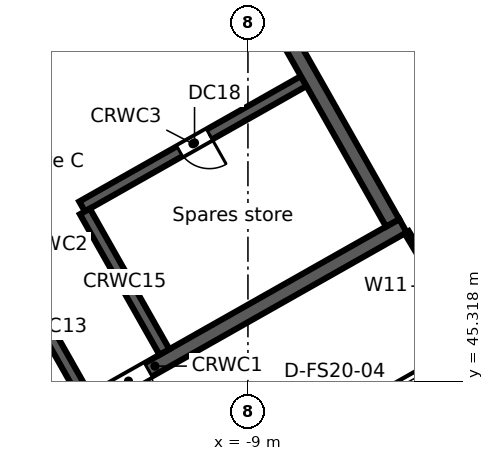
"""IFC4 building model, lengths in metres.
Left out: names, types, materials, properties, quantities, classifications, styles, units other than length and angle.
Written with IfcOpenShell. Run it as: python <this file> out.ifc"""

import sys

from ifc_helpers import new_model, si_unit, direction, frame, frame_2d, origin, place, context, subcontext, project, spatial, rectangle, extrude, element, fill, save


model = new_model("IFC4")
c1 = context("Model", 3, precision=1e-05, world=origin(), true_north=direction((0.0, 1.0)))
c2 = subcontext(c1, "Body", "Model", "MODEL_VIEW")
j1 = project(units=[si_unit("LENGTHUNIT", "METRE"), si_unit("PLANEANGLEUNIT", "RADIAN")], contexts=[c1])
p1 = place(None, origin())
s1 = spatial("IfcSite", under=j1, at=p1, CompositionType="ELEMENT")
p2 = place(p1, origin())
s2 = spatial("IfcBuilding", under=s1, at=p2, CompositionType="ELEMENT")
p3 = place(p2, frame((0.0, 0.0, 308.3)))
s3 = spatial("IfcBuildingStorey", under=s2, at=p3, CompositionType="ELEMENT", Elevation=308.3)
p4 = place(p3, frame((-58.732, 38.771, 0.0), z_axis=(0.0, 0.0, 1.0), x_axis=(0.870355615581, 0.492423702137, 0.0)))
e1 = element("IfcWall", 1, at=p4, inside=s3, PredefinedType="STANDARD", context=c2, shape_type="SweptSolid", body=[
    extrude(rectangle(XDim=64.052, YDim=0.25, at=frame_2d((32.026, 0.0))), origin(), (0.0, 0.0, 1.0), 3.45),
])
p5 = place(p4, frame((61.259, 0.0, 0.8)))
e2 = element("IfcOpeningElement", 2, at=p5, cuts=e1, PredefinedType="OPENING", context=c2, shape_type="SweptSolid", body=[
    extrude(rectangle(XDim=2.4, YDim=2.2, at=frame_2d((1.2, 1.1))), frame((0.0, 0.135, 0.0), z_axis=(0.0, -1.0, 0.0), x_axis=(1.0, 0.0, 0.0)), (0.0, 0.0, 1.0), 0.27),
])
p6 = place(p4, frame((58.216, 0.0, 0.8)))
e3 = element("IfcOpeningElement", 3, at=p6, cuts=e1, PredefinedType="OPENING", context=c2, shape_type="SweptSolid", body=[
    extrude(rectangle(XDim=2.4, YDim=2.2, at=frame_2d((1.2, 1.1))), frame((0.0, 0.135, 0.0), z_axis=(0.0, -1.0, 0.0), x_axis=(1.0, 0.0, 0.0)), (0.0, 0.0, 1.0), 0.27),
])
p7 = place(p4, frame((55.173, 0.0, 0.8)))
e4 = element("IfcOpeningElement", 4, at=p7, cuts=e1, PredefinedType="OPENING", context=c2, shape_type="SweptSolid", body=[
    extrude(rectangle(XDim=2.4, YDim=2.2, at=frame_2d((1.2, 1.1))), frame((0.0, 0.135, 0.0), z_axis=(0.0, -1.0, 0.0), x_axis=(1.0, 0.0, 0.0)), (0.0, 0.0, 1.0), 0.27),
])
p8 = place(p4, frame((52.129, 0.0, 0.8)))
e5 = element("IfcOpeningElement", 5, at=p8, cuts=e1, PredefinedType="OPENING", context=c2, shape_type="SweptSolid", body=[
    extrude(rectangle(XDim=2.4, YDim=2.2, at=frame_2d((1.2, 1.1))), frame((0.0, 0.135, 0.0), z_axis=(0.0, -1.0, 0.0), x_axis=(1.0, 0.0, 0.0)), (0.0, 0.0, 1.0), 0.27),
])
p9 = place(p4, frame((49.086, 0.0, 0.8)))
e6 = element("IfcOpeningElement", 6, at=p9, cuts=e1, PredefinedType="OPENING", context=c2, shape_type="SweptSolid", body=[
    extrude(rectangle(XDim=2.4, YDim=2.2, at=frame_2d((1.2, 1.1))), frame((0.0, 0.135, 0.0), z_axis=(0.0, -1.0, 0.0), x_axis=(1.0, 0.0, 0.0)), (0.0, 0.0, 1.0), 0.27),
])
p10 = place(p4, frame((46.043, 0.0, 0.8)))
e7 = element("IfcOpeningElement", 7, at=p10, cuts=e1, PredefinedType="OPENING", context=c2, shape_type="SweptSolid", body=[
    extrude(rectangle(XDim=2.4, YDim=2.2, at=frame_2d((1.2, 1.1))), frame((0.0, 0.135, 0.0), z_axis=(0.0, -1.0, 0.0), x_axis=(1.0, 0.0, 0.0)), (0.0, 0.0, 1.0), 0.27),
])
p11 = place(p4, frame((43.0, 0.0, 0.8)))
e8 = element("IfcOpeningElement", 8, at=p11, cuts=e1, PredefinedType="OPENING", context=c2, shape_type="SweptSolid", body=[
    extrude(rectangle(XDim=2.4, YDim=2.2, at=frame_2d((1.2, 1.1))), frame((0.0, 0.135, 0.0), z_axis=(0.0, -1.0, 0.0), x_axis=(1.0, 0.0, 0.0)), (0.0, 0.0, 1.0), 0.27),
])
p12 = place(p4, frame((39.956, 0.0, 0.8)))
e9 = element("IfcOpeningElement", 9, at=p12, cuts=e1, PredefinedType="OPENING", context=c2, shape_type="SweptSolid", body=[
    extrude(rectangle(XDim=2.4, YDim=2.2, at=frame_2d((1.2, 1.1))), frame((0.0, 0.135, 0.0), z_axis=(0.0, -1.0, 0.0), x_axis=(1.0, 0.0, 0.0)), (0.0, 0.0, 1.0), 0.27),
])
p13 = place(p4, frame((36.913, 0.0, 0.8)))
e10 = element("IfcOpeningElement", 10, at=p13, cuts=e1, PredefinedType="OPENING", context=c2, shape_type="SweptSolid", body=[
    extrude(rectangle(XDim=2.4, YDim=2.2, at=frame_2d((1.2, 1.1))), frame((0.0, 0.135, 0.0), z_axis=(0.0, -1.0, 0.0), x_axis=(1.0, 0.0, 0.0)), (0.0, 0.0, 1.0), 0.27),
])
p14 = place(p4, frame((33.87, 0.0, 0.8)))
e11 = element("IfcOpeningElement", 11, at=p14, cuts=e1, PredefinedType="OPENING", context=c2, shape_type="SweptSolid", body=[
    extrude(rectangle(XDim=2.4, YDim=2.2, at=frame_2d((1.2, 1.1))), frame((0.0, 0.135, 0.0), z_axis=(0.0, -1.0, 0.0), x_axis=(1.0, 0.0, 0.0)), (0.0, 0.0, 1.0), 0.27),
])
p15 = place(p4, frame((30.826, 0.0, 0.8)))
e12 = element("IfcOpeningElement", 12, at=p15, cuts=e1, PredefinedType="OPENING", context=c2, shape_type="SweptSolid", body=[
    extrude(rectangle(XDim=2.4, YDim=2.2, at=frame_2d((1.2, 1.1))), frame((0.0, 0.135, 0.0), z_axis=(0.0, -1.0, 0.0), x_axis=(1.0, 0.0, 0.0)), (0.0, 0.0, 1.0), 0.27),
])
p16 = place(p4, frame((27.783, 0.0, 0.8)))
e13 = element("IfcOpeningElement", 13, at=p16, cuts=e1, PredefinedType="OPENING", context=c2, shape_type="SweptSolid", body=[
    extrude(rectangle(XDim=2.4, YDim=2.2, at=frame_2d((1.2, 1.1))), frame((0.0, 0.135, 0.0), z_axis=(0.0, -1.0, 0.0), x_axis=(1.0, 0.0, 0.0)), (0.0, 0.0, 1.0), 0.27),
])
p17 = place(p4, frame((24.74, 0.0, 0.8)))
e14 = element("IfcOpeningElement", 14, at=p17, cuts=e1, PredefinedType="OPENING", context=c2, shape_type="SweptSolid", body=[
    extrude(rectangle(XDim=2.4, YDim=2.2, at=frame_2d((1.2, 1.1))), frame((0.0, 0.135, 0.0), z_axis=(0.0, -1.0, 0.0), x_axis=(1.0, 0.0, 0.0)), (0.0, 0.0, 1.0), 0.27),
])
p18 = place(p4, frame((21.696, 0.0, 0.8)))
e15 = element("IfcOpeningElement", 15, at=p18, cuts=e1, PredefinedType="OPENING", context=c2, shape_type="SweptSolid", body=[
    extrude(rectangle(XDim=2.4, YDim=2.2, at=frame_2d((1.2, 1.1))), frame((0.0, 0.135, 0.0), z_axis=(0.0, -1.0, 0.0), x_axis=(1.0, 0.0, 0.0)), (0.0, 0.0, 1.0), 0.27),
])
p19 = place(p4, frame((18.653, 0.0, 0.8)))
e16 = element("IfcOpeningElement", 16, at=p19, cuts=e1, PredefinedType="OPENING", context=c2, shape_type="SweptSolid", body=[
    extrude(rectangle(XDim=2.4, YDim=2.2, at=frame_2d((1.2, 1.1))), frame((0.0, 0.135, 0.0), z_axis=(0.0, -1.0, 0.0), x_axis=(1.0, 0.0, 0.0)), (0.0, 0.0, 1.0), 0.27),
])
p20 = place(p4, frame((15.61, 0.0, 0.8)))
e17 = element("IfcOpeningElement", 17, at=p20, cuts=e1, PredefinedType="OPENING", context=c2, shape_type="SweptSolid", body=[
    extrude(rectangle(XDim=2.4, YDim=2.2, at=frame_2d((1.2, 1.1))), frame((0.0, 0.135, 0.0), z_axis=(0.0, -1.0, 0.0), x_axis=(1.0, 0.0, 0.0)), (0.0, 0.0, 1.0), 0.27),
])
p21 = place(p4, frame((12.567, 0.0, 0.8)))
e18 = element("IfcOpeningElement", 18, at=p21, cuts=e1, PredefinedType="OPENING", context=c2, shape_type="SweptSolid", body=[
    extrude(rectangle(XDim=2.4, YDim=2.2, at=frame_2d((1.2, 1.1))), frame((0.0, 0.135, 0.0), z_axis=(0.0, -1.0, 0.0), x_axis=(1.0, 0.0, 0.0)), (0.0, 0.0, 1.0), 0.27),
])
p22 = place(p4, frame((9.523, 0.0, 0.8)))
e19 = element("IfcOpeningElement", 19, at=p22, cuts=e1, PredefinedType="OPENING", context=c2, shape_type="SweptSolid", body=[
    extrude(rectangle(XDim=2.4, YDim=2.2, at=frame_2d((1.2, 1.1))), frame((0.0, 0.135, 0.0), z_axis=(0.0, -1.0, 0.0), x_axis=(1.0, 0.0, 0.0)), (0.0, 0.0, 1.0), 0.27),
])
p23 = place(p4, frame((6.48, 0.0, 0.8)))
e20 = element("IfcOpeningElement", 20, at=p23, cuts=e1, PredefinedType="OPENING", context=c2, shape_type="SweptSolid", body=[
    extrude(rectangle(XDim=2.4, YDim=2.2, at=frame_2d((1.2, 1.1))), frame((0.0, 0.135, 0.0), z_axis=(0.0, -1.0, 0.0), x_axis=(1.0, 0.0, 0.0)), (0.0, 0.0, 1.0), 0.27),
])
p24 = place(p4, frame((3.437, 0.0, 0.8)))
e21 = element("IfcOpeningElement", 21, at=p24, cuts=e1, PredefinedType="OPENING", context=c2, shape_type="SweptSolid", body=[
    extrude(rectangle(XDim=2.4, YDim=2.2, at=frame_2d((1.2, 1.1))), frame((0.0, 0.135, 0.0), z_axis=(0.0, -1.0, 0.0), x_axis=(1.0, 0.0, 0.0)), (0.0, 0.0, 1.0), 0.27),
])
p25 = place(p4, frame((0.393, 0.0, 0.8)))
e22 = element("IfcOpeningElement", 22, at=p25, cuts=e1, PredefinedType="OPENING", context=c2, shape_type="SweptSolid", body=[
    extrude(rectangle(XDim=2.4, YDim=2.2, at=frame_2d((1.2, 1.1))), frame((0.0, 0.135, 0.0), z_axis=(0.0, -1.0, 0.0), x_axis=(1.0, 0.0, 0.0)), (0.0, 0.0, 1.0), 0.27),
])
p26 = place(p3, frame((-3.017, 46.293, 0.0), z_axis=(0.0, 0.0, 1.0), x_axis=(-0.870355474887, -0.492423950812, 0.0)))
e23 = element("IfcWall", 23, at=p26, inside=s3, PredefinedType="STANDARD", context=c2, shape_type="SweptSolid", body=[
    extrude(rectangle(XDim=40.34, YDim=0.25, at=frame_2d((20.17, 0.0))), origin(), (0.0, 0.0, 1.0), 3.45),
])
p27 = place(p26, frame((37.428, 0.0, 0.8)))
e24 = element("IfcOpeningElement", 24, at=p27, cuts=e23, PredefinedType="OPENING", context=c2, shape_type="SweptSolid", body=[
    extrude(rectangle(XDim=2.4, YDim=2.2, at=frame_2d((1.2, 1.1))), frame((0.0, 0.135, 0.0), z_axis=(0.0, -1.0, 0.0), x_axis=(1.0, 0.0, 0.0)), (0.0, 0.0, 1.0), 0.27),
])
p28 = place(p26, frame((34.372, 0.0, 0.0)))
e25 = element("IfcOpeningElement", 25, at=p28, cuts=e23, PredefinedType="OPENING", context=c2, shape_type="SweptSolid", body=[
    extrude(rectangle(XDim=1.8, YDim=2.4, at=frame_2d((0.9, 1.2))), frame((0.0, 0.135, 0.0), z_axis=(0.0, -1.0, 0.0), x_axis=(1.0, 0.0, 0.0)), (0.0, 0.0, 1.0), 0.27),
])
p29 = place(p26, frame((30.716, 0.0, 0.8)))
e26 = element("IfcOpeningElement", 26, at=p29, cuts=e23, PredefinedType="OPENING", context=c2, shape_type="SweptSolid", body=[
    extrude(rectangle(XDim=2.4, YDim=2.2, at=frame_2d((1.2, 1.1))), frame((0.0, 0.135, 0.0), z_axis=(0.0, -1.0, 0.0), x_axis=(1.0, 0.0, 0.0)), (0.0, 0.0, 1.0), 0.27),
])
p30 = place(p26, frame((27.36, 0.0, 0.8)))
e27 = element("IfcOpeningElement", 27, at=p30, cuts=e23, PredefinedType="OPENING", context=c2, shape_type="SweptSolid", body=[
    extrude(rectangle(XDim=2.4, YDim=2.2, at=frame_2d((1.2, 1.1))), frame((0.0, 0.135, 0.0), z_axis=(0.0, -1.0, 0.0), x_axis=(1.0, 0.0, 0.0)), (0.0, 0.0, 1.0), 0.27),
])
p31 = place(p26, frame((24.304, 0.0, 0.0)))
e28 = element("IfcOpeningElement", 28, at=p31, cuts=e23, PredefinedType="OPENING", context=c2, shape_type="SweptSolid", body=[
    extrude(rectangle(XDim=1.8, YDim=2.4, at=frame_2d((0.9, 1.2))), frame((0.0, 0.135, 0.0), z_axis=(0.0, -1.0, 0.0), x_axis=(1.0, 0.0, 0.0)), (0.0, 0.0, 1.0), 0.27),
])
p32 = place(p26, frame((20.648, 0.0, 0.8)))
e29 = element("IfcOpeningElement", 29, at=p32, cuts=e23, PredefinedType="OPENING", context=c2, shape_type="SweptSolid", body=[
    extrude(rectangle(XDim=2.4, YDim=2.2, at=frame_2d((1.2, 1.1))), frame((0.0, 0.135, 0.0), z_axis=(0.0, -1.0, 0.0), x_axis=(1.0, 0.0, 0.0)), (0.0, 0.0, 1.0), 0.27),
])
p33 = place(p26, frame((17.292, 0.0, 0.8)))
e30 = element("IfcOpeningElement", 30, at=p33, cuts=e23, PredefinedType="OPENING", context=c2, shape_type="SweptSolid", body=[
    extrude(rectangle(XDim=2.4, YDim=2.2, at=frame_2d((1.2, 1.1))), frame((0.0, 0.135, 0.0), z_axis=(0.0, -1.0, 0.0), x_axis=(1.0, 0.0, 0.0)), (0.0, 0.0, 1.0), 0.27),
])
p34 = place(p26, frame((14.236, 0.0, 0.0)))
e31 = element("IfcOpeningElement", 31, at=p34, cuts=e23, PredefinedType="OPENING", context=c2, shape_type="SweptSolid", body=[
    extrude(rectangle(XDim=1.8, YDim=2.4, at=frame_2d((0.9, 1.2))), frame((0.0, 0.135, 0.0), z_axis=(0.0, -1.0, 0.0), x_axis=(1.0, 0.0, 0.0)), (0.0, 0.0, 1.0), 0.27),
])
p35 = place(p26, frame((10.58, 0.0, 0.8)))
e32 = element("IfcOpeningElement", 32, at=p35, cuts=e23, PredefinedType="OPENING", context=c2, shape_type="SweptSolid", body=[
    extrude(rectangle(XDim=2.4, YDim=2.2, at=frame_2d((1.2, 1.1))), frame((0.0, 0.135, 0.0), z_axis=(0.0, -1.0, 0.0), x_axis=(1.0, 0.0, 0.0)), (0.0, 0.0, 1.0), 0.27),
])
p36 = place(p26, frame((7.224, 0.0, 0.8)))
e33 = element("IfcOpeningElement", 33, at=p36, cuts=e23, PredefinedType="OPENING", context=c2, shape_type="SweptSolid", body=[
    extrude(rectangle(XDim=2.4, YDim=2.2, at=frame_2d((1.2, 1.1))), frame((0.0, 0.135, 0.0), z_axis=(0.0, -1.0, 0.0), x_axis=(1.0, 0.0, 0.0)), (0.0, 0.0, 1.0), 0.27),
])
p37 = place(p26, frame((4.168, 0.0, 0.0)))
e34 = element("IfcOpeningElement", 34, at=p37, cuts=e23, PredefinedType="OPENING", context=c2, shape_type="SweptSolid", body=[
    extrude(rectangle(XDim=1.8, YDim=2.4, at=frame_2d((0.9, 1.2))), frame((0.0, 0.135, 0.0), z_axis=(0.0, -1.0, 0.0), x_axis=(1.0, 0.0, 0.0)), (0.0, 0.0, 1.0), 0.27),
])
p38 = place(p26, frame((0.512, 0.0, 0.8)))
e35 = element("IfcOpeningElement", 35, at=p38, cuts=e23, PredefinedType="OPENING", context=c2, shape_type="SweptSolid", body=[
    extrude(rectangle(XDim=2.4, YDim=2.2, at=frame_2d((1.2, 1.1))), frame((0.0, 0.135, 0.0), z_axis=(0.0, -1.0, 0.0), x_axis=(1.0, 0.0, 0.0)), (0.0, 0.0, 1.0), 0.27),
])
p39 = place(p3, frame((-17.975, 42.017, 0.0), z_axis=(0.0, 0.0, 1.0), x_axis=(0.87034965173, 0.492434243055, 0.0)))
e36 = element("IfcWall", 36, at=p39, inside=s3, PredefinedType="SOLIDWALL", context=c2, shape_type="SweptSolid", body=[
    extrude(rectangle(XDim=15.0, YDim=0.4, at=frame_2d((7.5, 0.0))), origin(), (0.0, 0.0, 1.0), 3.45),
])
p40 = place(p39, frame((6.1, 0.0, 0.0)))
e37 = element("IfcOpeningElement", 37, at=p40, cuts=e36, PredefinedType="OPENING", context=c2, shape_type="SweptSolid", body=[
    extrude(rectangle(XDim=1.2, YDim=2.1, at=frame_2d((0.6, 1.05))), frame((0.0, 0.21, 0.0), z_axis=(0.0, -1.0, 0.0), x_axis=(1.0, 0.0, 0.0)), (0.0, 0.0, 1.0), 0.42),
])
p41 = place(p3, frame((-13.365, 49.911, 0.0), z_axis=(0.0, 0.0, 1.0), x_axis=(0.870347618718, 0.492437836272, 0.0)))
e38 = element("IfcWall", 38, at=p41, inside=s3, PredefinedType="SOLIDWALL", context=c2, shape_type="SweptSolid", body=[
    extrude(rectangle(XDim=6.7, YDim=0.3, at=frame_2d((3.35, 0.0))), origin(), (0.0, 0.0, 1.0), 3.45),
])
p42 = place(p41, frame((2.95, 0.0, 0.0)))
e39 = element("IfcOpeningElement", 39, at=p42, cuts=e38, PredefinedType="OPENING", context=c2, shape_type="SweptSolid", body=[
    extrude(rectangle(XDim=0.9, YDim=2.1, at=frame_2d((0.45, 1.05))), frame((0.0, 0.16, 0.0), z_axis=(0.0, -1.0, 0.0), x_axis=(1.0, 0.0, 0.0)), (0.0, 0.0, 1.0), 0.32),
])
p43 = place(p3, frame((-15.618, 53.691, 0.0), z_axis=(0.0, 0.0, 1.0), x_axis=(0.870362830851, 0.492410948978, 0.0)))
e40 = element("IfcWall", 40, at=p43, inside=s3, PredefinedType="SOLIDWALL", context=c2, shape_type="SweptSolid", body=[
    extrude(rectangle(XDim=6.8, YDim=0.3, at=frame_2d((3.4, 0.0))), origin(), (0.0, 0.0, 1.0), 3.45),
])
p44 = place(p43, frame((3.4, 0.0, 0.0)))
e41 = element("IfcOpeningElement", 41, at=p44, cuts=e40, PredefinedType="OPENING", context=c2, shape_type="SweptSolid", body=[
    extrude(rectangle(XDim=0.9, YDim=2.1, at=frame_2d((0.45, 1.05))), frame((0.0, 0.16, 0.0), z_axis=(0.0, -1.0, 0.0), x_axis=(1.0, 0.0, 0.0)), (0.0, 0.0, 1.0), 0.32),
])
p45 = place(p3, frame((-24.672, 53.854, 0.0), z_axis=(0.0, 0.0, 1.0), x_axis=(0.870353598469, 0.492427267353, 0.0)))
e42 = element("IfcWall", 42, at=p45, inside=s3, PredefinedType="SOLIDWALL", context=c2, shape_type="SweptSolid", body=[
    extrude(rectangle(XDim=15.0, YDim=0.4, at=frame_2d((7.5, 0.0))), origin(), (0.0, 0.0, 1.0), 3.45),
])
p46 = place(p3, frame((-15.379, 48.599, 0.0), z_axis=(0.0, 0.0, 1.0), x_axis=(0.492422543467, -0.870356271124, 0.0)))
e43 = element("IfcWall", 43, at=p46, inside=s3, PredefinedType="SOLIDWALL", context=c2, shape_type="SweptSolid", body=[
    extrude(rectangle(XDim=4.25, YDim=0.3, at=frame_2d((2.125, 0.0))), origin(), (0.0, 0.0, 1.0), 3.45),
])
p47 = place(p3, frame((-13.291, 49.781, 0.0), z_axis=(0.0, 0.0, 1.0), x_axis=(0.492397924348, -0.870370199454, 0.0)))
e44 = element("IfcWall", 44, at=p47, inside=s3, PredefinedType="SOLIDWALL", context=c2, shape_type="SweptSolid", body=[
    extrude(rectangle(XDim=4.25, YDim=0.3, at=frame_2d((2.125, 0.0))), origin(), (0.0, 0.0, 1.0), 3.45),
])
p48 = place(p3, frame((-11.692, 60.968, 0.0), z_axis=(0.0, 0.0, 1.0), x_axis=(0.492421663121, -0.870356769198, 0.0)))
e45 = element("IfcWall", 45, at=p48, inside=s3, PredefinedType="SOLIDWALL", context=c2, shape_type="SweptSolid", body=[
    extrude(rectangle(XDim=13.2, YDim=0.4, at=frame_2d((6.6, 0.0))), origin(), (0.0, 0.0, 1.0), 3.45),
])
p49 = place(p3, frame((-4.821, 49.23, 0.0), z_axis=(0.0, 0.0, 1.0), x_axis=(0.515006587647, -0.857186219371, 0.0)))
e46 = element("IfcWall", 46, at=p49, inside=s3, PredefinedType="PARTITIONING", context=c2, shape_type="SweptSolid", body=[
    extrude(rectangle(XDim=3.303, YDim=0.125, at=frame_2d((1.651, 0.0))), origin(), (0.0, 0.0, 1.0), 2.63),
])
p50 = place(p49, frame((1.2, 0.0, 0.0)))
e47 = element("IfcOpeningElement", 47, at=p50, cuts=e46, PredefinedType="OPENING", context=c2, shape_type="SweptSolid", body=[
    extrude(rectangle(XDim=0.9, YDim=2.1, at=frame_2d((0.45, 1.05))), frame((0.0, 0.073, 0.0), z_axis=(0.0, -1.0, 0.0), x_axis=(1.0, 0.0, 0.0)), (0.0, 0.0, 1.0), 0.145),
])
p51 = place(p38, origin())
e48 = element("IfcWindow", 48, at=p51, inside=s3, PartitioningType="SINGLE_PANEL", PredefinedType="WINDOW", context=c2, shape_type="SweptSolid", body=[
    extrude(rectangle(XDim=2.4, YDim=2.2, at=frame_2d((1.2, 1.1))), frame((0.0, 0.03, 0.0), z_axis=(0.0, -1.0, 0.0), x_axis=(1.0, 0.0, 0.0)), (0.0, 0.0, 1.0), 0.06),
])
fill(e35, e48)
p52 = place(p40, frame((1.2, 0.0, 0.0), z_axis=(0.0, 0.0, 1.0), x_axis=(-1.0, 0.0, 0.0)))
e49 = element("IfcDoor", 49, at=p52, inside=s3, OperationType="SINGLE_SWING_RIGHT", PredefinedType="DOOR", context=c2, shape_type="SweptSolid", body=[
    extrude(rectangle(XDim=1.2, YDim=2.1, at=frame_2d((0.6, 1.05))), frame((0.0, 0.025, 0.0), z_axis=(0.0, -1.0, 0.0), x_axis=(1.0, 0.0, 0.0)), (0.0, 0.0, 1.0), 0.05),
])
fill(e37, e49)
p53 = place(p42, frame((0.9, 0.0, 0.0), z_axis=(0.0, 0.0, 1.0), x_axis=(-1.0, 0.0, 0.0)))
e50 = element("IfcDoor", 50, at=p53, inside=s3, OperationType="SINGLE_SWING_LEFT", PredefinedType="DOOR", context=c2, shape_type="SweptSolid", body=[
    extrude(rectangle(XDim=0.9, YDim=2.1, at=frame_2d((0.45, 1.05))), frame((0.0, 0.025, 0.0), z_axis=(0.0, -1.0, 0.0), x_axis=(1.0, 0.0, 0.0)), (0.0, 0.0, 1.0), 0.05),
])
fill(e39, e50)
save(model, sys.argv[1])
